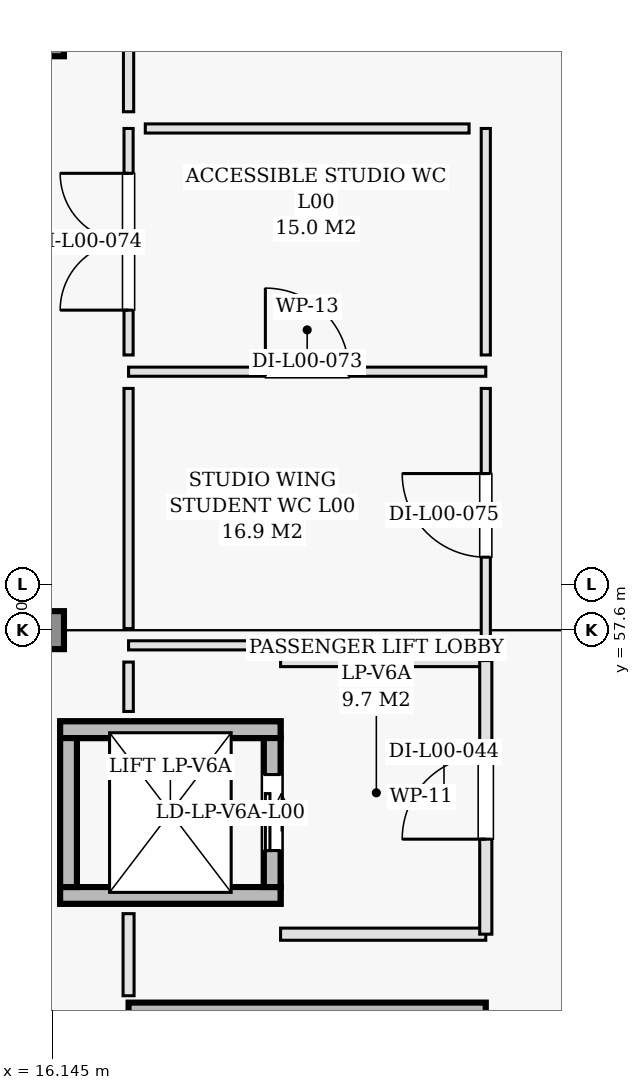
"""IFC4 building model, lengths in metres.
Left out: names, types, materials, properties, quantities, classifications, styles, units other than length and angle.
Written with IfcOpenShell. Run it as: python <this file> out.ifc"""

import sys

from ifc_helpers import new_model, si_unit, direction, frame, frame_2d, origin, origin_2d, place, context, subcontext, project, spatial, rectangle, extrude, element, fill, save


model = new_model("IFC4")
c1 = context("Model", 3, precision=1e-05, world=origin(), true_north=direction((0.0, 1.0)))
c2 = subcontext(c1, "Body", "Model", "MODEL_VIEW")
j1 = project(units=[si_unit("LENGTHUNIT", "METRE"), si_unit("PLANEANGLEUNIT", "RADIAN")], contexts=[c1])
p1 = place(None, origin())
s1 = spatial("IfcSite", under=j1, at=p1, CompositionType="ELEMENT")
p2 = place(p1, origin())
s2 = spatial("IfcBuilding", under=s1, at=p2, CompositionType="ELEMENT")
p3 = place(p2, origin())
s3 = spatial("IfcBuildingStorey", under=s2, at=p3, CompositionType="ELEMENT", Elevation=0.0)
for number, where, z_axis, x_axis in (
    (1, (16.0, 57.6, 0.0), (0.0, 0.0, 1.0), (1.0, 0.0, 0.0)),
    (2, (16.0, 65.4, 0.0), (0.0, 0.0, 1.0), (1.0, 0.0, 0.0)),
):
    element("IfcColumn", number, at=place(p3, frame(where, z_axis=z_axis, x_axis=x_axis)), inside=s3, PredefinedType="COLUMN", context=c2, shape_type="SweptSolid", body=[
        extrude(rectangle(XDim=0.5, YDim=0.5, at=origin_2d()), origin(), (0.0, 0.0, 1.0), 4.8),
    ])
p4 = place(p3, frame((17.15, 52.55, 0.0), z_axis=(0.0, 0.0, 1.0), x_axis=(1.0, 0.0, 0.0)))
e3 = element("IfcWall", 3, at=p4, inside=s3, PredefinedType="SHEAR", context=c2, shape_type="SweptSolid", body=[
    extrude(rectangle(XDim=4.7, YDim=0.3, at=frame_2d((2.35, 0.0))), origin(), (0.0, 0.0, 1.0), 4.52),
])
for number, where, z_axis, x_axis in (
    (4, (16.25, 54.11, -1.4), (0.0, 0.0, 1.0), (1.0, 0.0, 0.0)),
    (5, (16.25, 56.29, -1.4), (0.0, 0.0, 1.0), (1.0, 0.0, 0.0)),
):
    element("IfcWall", number, at=place(p3, frame(where, z_axis=z_axis, x_axis=x_axis)), inside=s3, PredefinedType="SHEAR", context=c2, shape_type="SweptSolid", body=[
        extrude(rectangle(XDim=2.9, YDim=0.22, at=frame_2d((1.45, 0.0))), origin(), (0.0, 0.0, 1.0), 1.05),
    ])
for number, where, z_axis, x_axis in (
    (6, (16.36, 54.22, -1.4), (0.0, 0.0, 1.0), (0.0, 1.0, 0.0)),
    (7, (19.04, 54.22, -1.4), (0.0, 0.0, 1.0), (0.0, 1.0, 0.0)),
):
    element("IfcWall", number, at=place(p3, frame(where, z_axis=z_axis, x_axis=x_axis)), inside=s3, PredefinedType="SHEAR", context=c2, shape_type="SweptSolid", body=[
        extrude(rectangle(XDim=1.96, YDim=0.22, at=frame_2d((0.98, 0.0))), origin(), (0.0, 0.0, 1.0), 1.05),
    ])
for number, where, z_axis, x_axis in (
    (8, (16.25, 54.11, 0.0), (0.0, 0.0, 1.0), (1.0, 0.0, 0.0)),
    (9, (16.25, 56.29, 0.0), (0.0, 0.0, 1.0), (1.0, 0.0, 0.0)),
):
    element("IfcWall", number, at=place(p3, frame(where, z_axis=z_axis, x_axis=x_axis)), inside=s3, PredefinedType="SHEAR", context=c2, shape_type="SweptSolid", body=[
        extrude(rectangle(XDim=2.9, YDim=0.22, at=frame_2d((1.45, 0.0))), origin(), (0.0, 0.0, 1.0), 4.52),
    ])
p5 = place(p3, frame((16.36, 54.22, 0.0), z_axis=(0.0, 0.0, 1.0), x_axis=(0.0, 1.0, 0.0)))
e10 = element("IfcWall", 10, at=p5, inside=s3, PredefinedType="SHEAR", context=c2, shape_type="SweptSolid", body=[
    extrude(rectangle(XDim=1.96, YDim=0.22, at=frame_2d((0.98, 0.0))), origin(), (0.0, 0.0, 1.0), 4.52),
])
p6 = place(p3, frame((19.04, 54.22, 0.0), z_axis=(0.0, 0.0, 1.0), x_axis=(0.0, 1.0, 0.0)))
e11 = element("IfcWall", 11, at=p6, inside=s3, PredefinedType="SHEAR", context=c2, shape_type="SweptSolid", body=[
    extrude(rectangle(XDim=1.96, YDim=0.22, at=frame_2d((0.98, 0.0))), origin(), (0.0, 0.0, 1.0), 4.52),
])
p7 = place(p6, frame((0.48, 0.0, 0.0)))
e12 = element("IfcOpeningElement", 12, at=p7, cuts=e11, PredefinedType="OPENING", context=c2, shape_type="SweptSolid", body=[
    extrude(rectangle(XDim=1.0, YDim=2.15, at=frame_2d((0.5, 1.075))), frame((0.0, 0.12, 0.0), z_axis=(0.0, -1.0, 0.0), x_axis=(1.0, 0.0, 0.0)), (0.0, 0.0, 1.0), 0.24),
])
for number, where, z_axis, x_axis in (
    (13, (19.15, 53.6, 0.0), (0.0, 0.0, 1.0), (1.0, 0.0, 0.0)),
    (14, (19.15, 57.2, 0.0), (0.0, 0.0, 1.0), (1.0, 0.0, 0.0)),
):
    element("IfcWall", number, at=place(p3, frame(where, z_axis=z_axis, x_axis=x_axis)), inside=s3, PredefinedType="PARTITIONING", context=c2, shape_type="SweptSolid", body=[
        extrude(rectangle(XDim=2.7, YDim=0.16, at=frame_2d((1.35, 0.0))), origin(), (0.0, 0.0, 1.0), 4.52),
    ])
p8 = place(p3, frame((21.85, 53.6, 0.0), z_axis=(0.0, 0.0, 1.0), x_axis=(0.0, 1.0, 0.0)))
e15 = element("IfcWall", 15, at=p8, inside=s3, PredefinedType="PARTITIONING", context=c2, shape_type="SweptSolid", body=[
    extrude(rectangle(XDim=3.6, YDim=0.16, at=frame_2d((1.8, 0.0))), origin(), (0.0, 0.0, 1.0), 4.52),
])
p9 = place(p8, frame((1.25, 0.0, 0.0)))
e16 = element("IfcOpeningElement", 16, at=p9, cuts=e15, PredefinedType="OPENING", context=c2, shape_type="SweptSolid", body=[
    extrude(rectangle(XDim=1.1, YDim=2.15, at=frame_2d((0.55, 1.075))), frame((0.0, 0.09, 0.0), z_axis=(0.0, -1.0, 0.0), x_axis=(1.0, 0.0, 0.0)), (0.0, 0.0, 1.0), 0.18),
])
p10 = place(p3, frame((17.15, 61.0, 0.0), z_axis=(0.0, 0.0, 1.0), x_axis=(1.0, 0.0, 0.0)))
e17 = element("IfcWall", 17, at=p10, inside=s3, PredefinedType="PARTITIONING", context=c2, shape_type="SweptSolid", body=[
    extrude(rectangle(XDim=4.7, YDim=0.12, at=frame_2d((2.35, 0.0))), origin(), (0.0, 0.0, 1.0), 4.52),
])
p11 = place(p10, frame((1.8, 0.0, 0.0)))
e18 = element("IfcOpeningElement", 18, at=p11, cuts=e17, PredefinedType="OPENING", context=c2, shape_type="SweptSolid", body=[
    extrude(rectangle(XDim=1.1, YDim=2.15, at=frame_2d((0.55, 1.075))), frame((0.0, 0.07, 0.0), z_axis=(0.0, -1.0, 0.0), x_axis=(1.0, 0.0, 0.0)), (0.0, 0.0, 1.0), 0.14),
])
p12 = place(p3, frame((21.85, 61.22, 0.0), z_axis=(0.0, 0.0, 1.0), x_axis=(0.0, 1.0, 0.0)))
e19 = element("IfcWall", 19, at=p12, inside=s3, PredefinedType="PARTITIONING", context=c2, shape_type="SweptSolid", body=[
    extrude(rectangle(XDim=2.98, YDim=0.12, at=frame_2d((1.49, 0.0))), origin(), (0.0, 0.0, 1.0), 4.065),
])
p13 = place(p3, frame((17.15, 61.22, 0.0), z_axis=(0.0, 0.0, 1.0), x_axis=(0.0, 1.0, 0.0)))
e20 = element("IfcWall", 20, at=p13, inside=s3, PredefinedType="PARTITIONING", context=c2, shape_type="SweptSolid", body=[
    extrude(rectangle(XDim=2.98, YDim=0.12, at=frame_2d((1.49, 0.0))), origin(), (0.0, 0.0, 1.0), 4.065),
])
p14 = place(p13, frame((0.59, 0.0, 0.0)))
e21 = element("IfcOpeningElement", 21, at=p14, cuts=e20, PredefinedType="OPENING", context=c2, shape_type="SweptSolid", body=[
    extrude(rectangle(XDim=1.8, YDim=2.2, at=frame_2d((0.9, 1.1))), frame((0.0, 0.07, 0.0), z_axis=(0.0, -1.0, 0.0), x_axis=(1.0, 0.0, 0.0)), (0.0, 0.0, 1.0), 0.14),
])
p15 = place(p3, frame((17.37, 64.2, 0.0), z_axis=(0.0, 0.0, 1.0), x_axis=(1.0, 0.0, 0.0)))
e22 = element("IfcWall", 22, at=p15, inside=s3, PredefinedType="PARTITIONING", context=c2, shape_type="SweptSolid", body=[
    extrude(rectangle(XDim=4.26, YDim=0.12, at=frame_2d((2.13, 0.0))), origin(), (0.0, 0.0, 1.0), 4.52),
])
p16 = place(p3, frame((21.85, 57.44, 0.0), z_axis=(0.0, 0.0, 1.0), x_axis=(0.0, 1.0, 0.0)))
e23 = element("IfcWall", 23, at=p16, inside=s3, PredefinedType="PARTITIONING", context=c2, shape_type="SweptSolid", body=[
    extrude(rectangle(XDim=3.34, YDim=0.12, at=frame_2d((1.67, 0.0))), origin(), (0.0, 0.0, 1.0), 3.805),
])
p17 = place(p16, frame((1.12, 0.0, 0.0)))
e24 = element("IfcOpeningElement", 24, at=p17, cuts=e23, PredefinedType="OPENING", context=c2, shape_type="SweptSolid", body=[
    extrude(rectangle(XDim=1.1, YDim=2.15, at=frame_2d((0.55, 1.075))), frame((0.0, 0.07, 0.0), z_axis=(0.0, -1.0, 0.0), x_axis=(1.0, 0.0, 0.0)), (0.0, 0.0, 1.0), 0.14),
])
p18 = place(p3, frame((17.15, 57.4, 0.0), z_axis=(0.0, 0.0, 1.0), x_axis=(1.0, 0.0, 0.0)))
e25 = element("IfcWall", 25, at=p18, inside=s3, PredefinedType="PARTITIONING", context=c2, shape_type="SweptSolid", body=[
    extrude(rectangle(XDim=1.867, YDim=0.12, at=frame_2d((0.934, 0.0))), origin(), (0.0, 0.0, 1.0), 3.805),
])
p19 = place(p3, frame((17.15, 57.62, 0.0), z_axis=(0.0, 0.0, 1.0), x_axis=(0.0, 1.0, 0.0)))
e26 = element("IfcWall", 26, at=p19, inside=s3, PredefinedType="PARTITIONING", context=c2, shape_type="SweptSolid", body=[
    extrude(rectangle(XDim=3.16, YDim=0.12, at=frame_2d((1.58, 0.0))), origin(), (0.0, 0.0, 1.0), 3.805),
])
p20 = place(p3, frame((17.15, 64.42, 0.0), z_axis=(0.0, 0.0, 1.0), x_axis=(0.0, 1.0, 0.0)))
e27 = element("IfcWall", 27, at=p20, inside=s3, PredefinedType="PARTITIONING", context=c2, shape_type="SweptSolid", body=[
    extrude(rectangle(XDim=0.98, YDim=0.135, at=frame_2d((0.49, 0.0))), origin(), (0.0, 0.0, 1.0), 3.805),
])
p21 = place(p3, frame((17.15, 56.53, 0.0), z_axis=(0.0, 0.0, 1.0), x_axis=(0.0, 1.0, 0.0)))
e28 = element("IfcWall", 28, at=p21, inside=s3, PredefinedType="PARTITIONING", context=c2, shape_type="SweptSolid", body=[
    extrude(rectangle(XDim=0.65, YDim=0.125, at=frame_2d((0.325, 0.0))), origin(), (0.0, 0.0, 1.0), 4.52),
])
p22 = place(p3, frame((17.15, 52.79, 0.0), z_axis=(0.0, 0.0, 1.0), x_axis=(0.0, 1.0, 0.0)))
e29 = element("IfcWall", 29, at=p22, inside=s3, PredefinedType="PARTITIONING", context=c2, shape_type="SweptSolid", body=[
    extrude(rectangle(XDim=1.08, YDim=0.145, at=frame_2d((0.54, 0.0))), origin(), (0.0, 0.0, 1.0), 4.52),
])
p23 = place(p7, origin())
e30 = element("IfcDoor", 30, at=p23, inside=s3, OperationType="SLIDING_TO_LEFT", PredefinedType="DOOR", context=c2, shape_type="SweptSolid", body=[
    extrude(rectangle(XDim=1.0, YDim=2.15, at=frame_2d((0.5, 1.075))), frame((0.0, 0.025, 0.0), z_axis=(0.0, -1.0, 0.0), x_axis=(1.0, 0.0, 0.0)), (0.0, 0.0, 1.0), 0.05),
])
fill(e12, e30)
p24 = place(p9, origin())
e31 = element("IfcDoor", 31, at=p24, inside=s3, OperationType="SINGLE_SWING_LEFT", PredefinedType="DOOR", context=c2, shape_type="SweptSolid", body=[
    extrude(rectangle(XDim=1.1, YDim=2.15, at=frame_2d((0.55, 1.075))), frame((0.0, 0.025, 0.0), z_axis=(0.0, -1.0, 0.0), x_axis=(1.0, 0.0, 0.0)), (0.0, 0.0, 1.0), 0.05),
])
fill(e16, e31)
p25 = place(p11, origin())
e32 = element("IfcDoor", 32, at=p25, inside=s3, OperationType="SINGLE_SWING_LEFT", PredefinedType="DOOR", context=c2, shape_type="SweptSolid", body=[
    extrude(rectangle(XDim=1.1, YDim=2.15, at=frame_2d((0.55, 1.075))), frame((0.0, 0.025, 0.0), z_axis=(0.0, -1.0, 0.0), x_axis=(1.0, 0.0, 0.0)), (0.0, 0.0, 1.0), 0.05),
])
fill(e18, e32)
p26 = place(p14, origin())
e33 = element("IfcDoor", 33, at=p26, inside=s3, OperationType="DOUBLE_DOOR_SINGLE_SWING", PredefinedType="DOOR", context=c2, shape_type="SweptSolid", body=[
    extrude(rectangle(XDim=1.8, YDim=2.2, at=frame_2d((0.9, 1.1))), frame((0.0, 0.025, 0.0), z_axis=(0.0, -1.0, 0.0), x_axis=(1.0, 0.0, 0.0)), (0.0, 0.0, 1.0), 0.05),
])
fill(e21, e33)
p27 = place(p17, origin())
e34 = element("IfcDoor", 34, at=p27, inside=s3, OperationType="SINGLE_SWING_RIGHT", PredefinedType="DOOR", context=c2, shape_type="SweptSolid", body=[
    extrude(rectangle(XDim=1.1, YDim=2.15, at=frame_2d((0.55, 1.075))), frame((0.0, 0.025, 0.0), z_axis=(0.0, -1.0, 0.0), x_axis=(1.0, 0.0, 0.0)), (0.0, 0.0, 1.0), 0.05),
])
fill(e24, e34)
save(model, sys.argv[1])
